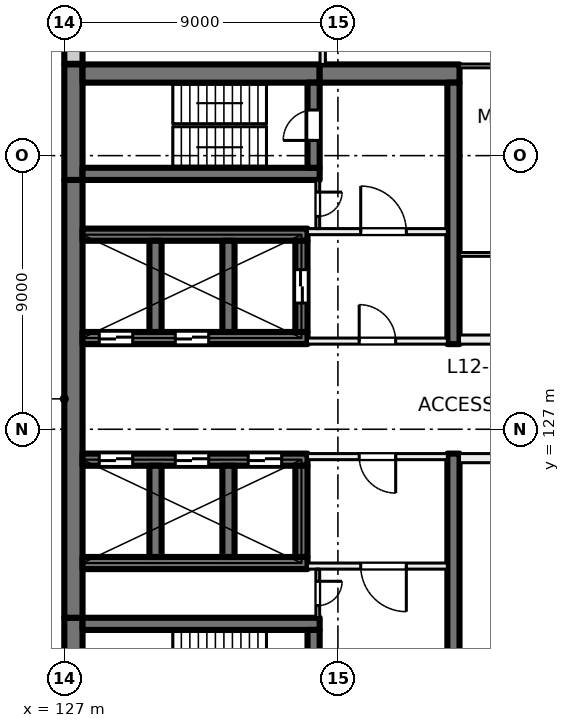
"""IFC4 building model, lengths in metres.
Left out: names, types, materials, properties, quantities, classifications, styles, units other than length and angle.
Written with IfcOpenShell. Run it as: python <this file> out.ifc"""

import sys

from ifc_helpers import new_model, si_unit, direction, frame, frame_2d, origin, place, context, subcontext, project, spatial, rectangle, extrude, element, fill, save


model = new_model("IFC4")
c1 = context("Model", 3, precision=1e-05, world=origin(), true_north=direction((0.0, 1.0)))
c2 = subcontext(c1, "Body", "Model", "MODEL_VIEW")
j1 = project(units=[si_unit("LENGTHUNIT", "METRE"), si_unit("PLANEANGLEUNIT", "RADIAN")], contexts=[c1])
p1 = place(None, origin())
s1 = spatial("IfcSite", under=j1, at=p1, CompositionType="ELEMENT")
p2 = place(p1, origin())
s2 = spatial("IfcBuilding", under=s1, at=p2, CompositionType="ELEMENT")
p3 = place(p2, frame((0.0, 0.0, 55.5)))
s3 = spatial("IfcBuildingStorey", under=s2, at=p3, CompositionType="ELEMENT", Elevation=55.5)
p4 = place(p3, frame((127.3, 117.0, 0.0), z_axis=(0.0, 0.0, 1.0), x_axis=(0.0, 1.0, 0.0)))
e1 = element("IfcWall", 1, at=p4, inside=s3, PredefinedType="SHEAR", context=c2, shape_type="SweptSolid", body=[
    extrude(rectangle(XDim=3.8, YDim=0.6, at=frame_2d((1.9, 0.0))), origin(), (0.0, 0.0, 1.0), 4.0),
])
p5 = place(p3, frame((127.3, 120.8, 0.0), z_axis=(0.0, 0.0, 1.0), x_axis=(0.0, 1.0, 0.0)))
e2 = element("IfcWall", 2, at=p5, inside=s3, PredefinedType="SHEAR", context=c2, shape_type="SweptSolid", body=[
    extrude(rectangle(XDim=14.4, YDim=0.6, at=frame_2d((7.2, 0.0))), origin(), (0.0, 0.0, 1.0), 4.0),
])
p6 = place(p3, frame((127.3, 135.2, 0.0), z_axis=(0.0, 0.0, 1.0), x_axis=(0.0, 1.0, 0.0)))
e3 = element("IfcWall", 3, at=p6, inside=s3, PredefinedType="SHEAR", context=c2, shape_type="SweptSolid", body=[
    extrude(rectangle(XDim=3.8, YDim=0.6, at=frame_2d((1.9, 0.0))), origin(), (0.0, 0.0, 1.0), 4.0),
])
p7 = place(p3, frame((127.6, 138.7, 0.0), z_axis=(0.0, 0.0, 1.0), x_axis=(1.0, 0.0, 0.0)))
e4 = element("IfcWall", 4, at=p7, inside=s3, PredefinedType="SHEAR", context=c2, shape_type="SweptSolid", body=[
    extrude(rectangle(XDim=7.8, YDim=0.6, at=frame_2d((3.9, 0.0))), origin(), (0.0, 0.0, 1.0), 4.0),
])
p8 = place(p3, frame((135.4, 138.7, 0.0), z_axis=(0.0, 0.0, 1.0), x_axis=(1.0, 0.0, 0.0)))
e5 = element("IfcWall", 5, at=p8, inside=s3, PredefinedType="SHEAR", context=c2, shape_type="SweptSolid", body=[
    extrude(rectangle(XDim=4.6, YDim=0.6, at=frame_2d((2.3, 0.0))), origin(), (0.0, 0.0, 1.0), 4.0),
])
p9 = place(p3, frame((127.6, 120.6, 0.0), z_axis=(0.0, 0.0, 1.0), x_axis=(1.0, 0.0, 0.0)))
e6 = element("IfcWall", 6, at=p9, inside=s3, PredefinedType="SHEAR", context=c2, shape_type="SweptSolid", body=[
    extrude(rectangle(XDim=7.8, YDim=0.4, at=frame_2d((3.9, 0.0))), origin(), (0.0, 0.0, 1.0), 4.0),
])
p10 = place(p3, frame((135.2, 117.6, 0.0), z_axis=(0.0, 0.0, 1.0), x_axis=(0.0, 1.0, 0.0)))
e7 = element("IfcWall", 7, at=p10, inside=s3, PredefinedType="SHEAR", context=c2, shape_type="SweptSolid", body=[
    extrude(rectangle(XDim=2.8, YDim=0.4, at=frame_2d((1.4, 0.0))), origin(), (0.0, 0.0, 1.0), 4.0),
])
p11 = place(p10, frame((0.9, 0.0, 0.0)))
e8 = element("IfcOpeningElement", 8, at=p11, cuts=e7, PredefinedType="OPENING", context=c2, shape_type="SweptSolid", body=[
    extrude(rectangle(XDim=1.0, YDim=2.1, at=frame_2d((0.5, 1.05))), frame((0.0, 0.21, 0.0), z_axis=(0.0, -1.0, 0.0), x_axis=(1.0, 0.0, 0.0)), (0.0, 0.0, 1.0), 0.42),
])
p12 = place(p3, frame((127.6, 135.4, 0.0), z_axis=(0.0, 0.0, 1.0), x_axis=(1.0, 0.0, 0.0)))
e9 = element("IfcWall", 9, at=p12, inside=s3, PredefinedType="SHEAR", context=c2, shape_type="SweptSolid", body=[
    extrude(rectangle(XDim=7.8, YDim=0.4, at=frame_2d((3.9, 0.0))), origin(), (0.0, 0.0, 1.0), 4.0),
])
p13 = place(p3, frame((135.2, 135.6, 0.0), z_axis=(0.0, 0.0, 1.0), x_axis=(0.0, 1.0, 0.0)))
e10 = element("IfcWall", 10, at=p13, inside=s3, PredefinedType="SHEAR", context=c2, shape_type="SweptSolid", body=[
    extrude(rectangle(XDim=2.8, YDim=0.4, at=frame_2d((1.4, 0.0))), origin(), (0.0, 0.0, 1.0), 4.0),
])
p14 = place(p13, frame((0.9, 0.0, 0.0)))
e11 = element("IfcOpeningElement", 11, at=p14, cuts=e10, PredefinedType="OPENING", context=c2, shape_type="SweptSolid", body=[
    extrude(rectangle(XDim=1.0, YDim=2.1, at=frame_2d((0.5, 1.05))), frame((0.0, 0.21, 0.0), z_axis=(0.0, -1.0, 0.0), x_axis=(1.0, 0.0, 0.0)), (0.0, 0.0, 1.0), 0.42),
])
p15 = place(p3, frame((127.6, 126.0, 0.0), z_axis=(0.0, 0.0, 1.0), x_axis=(1.0, 0.0, 0.0)))
e12 = element("IfcWall", 12, at=p15, inside=s3, PredefinedType="SHEAR", context=c2, shape_type="SweptSolid", body=[
    extrude(rectangle(XDim=7.4, YDim=0.4, at=frame_2d((3.7, 0.0))), origin(), (0.0, 0.0, 1.0), 4.0),
])
p16 = place(p15, frame((0.55, 0.0, 0.0)))
e13 = element("IfcOpeningElement", 13, at=p16, cuts=e12, PredefinedType="OPENING", context=c2, shape_type="SweptSolid", body=[
    extrude(rectangle(XDim=1.1, YDim=2.1, at=frame_2d((0.55, 1.05))), frame((0.0, 0.21, 0.0), z_axis=(0.0, -1.0, 0.0), x_axis=(1.0, 0.0, 0.0)), (0.0, 0.0, 1.0), 0.42),
])
p17 = place(p15, frame((3.05, 0.0, 0.0)))
e14 = element("IfcOpeningElement", 14, at=p17, cuts=e12, PredefinedType="OPENING", context=c2, shape_type="SweptSolid", body=[
    extrude(rectangle(XDim=1.1, YDim=2.1, at=frame_2d((0.55, 1.05))), frame((0.0, 0.21, 0.0), z_axis=(0.0, -1.0, 0.0), x_axis=(1.0, 0.0, 0.0)), (0.0, 0.0, 1.0), 0.42),
])
p18 = place(p15, frame((5.45, 0.0, 0.0)))
e15 = element("IfcOpeningElement", 15, at=p18, cuts=e12, PredefinedType="OPENING", context=c2, shape_type="SweptSolid", body=[
    extrude(rectangle(XDim=1.1, YDim=2.1, at=frame_2d((0.55, 1.05))), frame((0.0, 0.21, 0.0), z_axis=(0.0, -1.0, 0.0), x_axis=(1.0, 0.0, 0.0)), (0.0, 0.0, 1.0), 0.42),
])
p19 = place(p3, frame((127.6, 122.6, 0.0), z_axis=(0.0, 0.0, 1.0), x_axis=(1.0, 0.0, 0.0)))
e16 = element("IfcWall", 16, at=p19, inside=s3, PredefinedType="SHEAR", context=c2, shape_type="SweptSolid", body=[
    extrude(rectangle(XDim=7.4, YDim=0.4, at=frame_2d((3.7, 0.0))), origin(), (0.0, 0.0, 1.0), 4.0),
])
for number, where, z_axis, x_axis in (
    (17, (130.0, 122.8, 0.0), (0.0, 0.0, 1.0), (0.0, 1.0, 0.0)),
    (18, (132.4, 122.8, 0.0), (0.0, 0.0, 1.0), (0.0, 1.0, 0.0)),
    (19, (134.8, 122.8, 0.0), (0.0, 0.0, 1.0), (0.0, 1.0, 0.0)),
):
    element("IfcWall", number, at=place(p3, frame(where, z_axis=z_axis, x_axis=x_axis)), inside=s3, PredefinedType="SHEAR", context=c2, shape_type="SweptSolid", body=[
        extrude(rectangle(XDim=3.0, YDim=0.4, at=frame_2d((1.5, 0.0))), origin(), (0.0, 0.0, 1.0), 4.0),
    ])
p20 = place(p3, frame((127.6, 130.0, 0.0), z_axis=(0.0, 0.0, 1.0), x_axis=(1.0, 0.0, 0.0)))
e20 = element("IfcWall", 20, at=p20, inside=s3, PredefinedType="SHEAR", context=c2, shape_type="SweptSolid", body=[
    extrude(rectangle(XDim=7.4, YDim=0.4, at=frame_2d((3.7, 0.0))), origin(), (0.0, 0.0, 1.0), 4.0),
])
p21 = place(p20, frame((0.55, 0.0, 0.0)))
e21 = element("IfcOpeningElement", 21, at=p21, cuts=e20, PredefinedType="OPENING", context=c2, shape_type="SweptSolid", body=[
    extrude(rectangle(XDim=1.1, YDim=2.1, at=frame_2d((0.55, 1.05))), frame((0.0, 0.21, 0.0), z_axis=(0.0, -1.0, 0.0), x_axis=(1.0, 0.0, 0.0)), (0.0, 0.0, 1.0), 0.42),
])
p22 = place(p20, frame((3.05, 0.0, 0.0)))
e22 = element("IfcOpeningElement", 22, at=p22, cuts=e20, PredefinedType="OPENING", context=c2, shape_type="SweptSolid", body=[
    extrude(rectangle(XDim=1.1, YDim=2.1, at=frame_2d((0.55, 1.05))), frame((0.0, 0.21, 0.0), z_axis=(0.0, -1.0, 0.0), x_axis=(1.0, 0.0, 0.0)), (0.0, 0.0, 1.0), 0.42),
])
p23 = place(p3, frame((127.6, 133.4, 0.0), z_axis=(0.0, 0.0, 1.0), x_axis=(1.0, 0.0, 0.0)))
e23 = element("IfcWall", 23, at=p23, inside=s3, PredefinedType="SHEAR", context=c2, shape_type="SweptSolid", body=[
    extrude(rectangle(XDim=7.4, YDim=0.4, at=frame_2d((3.7, 0.0))), origin(), (0.0, 0.0, 1.0), 4.0),
])
for number, where, z_axis, x_axis in (
    (24, (130.0, 130.2, 0.0), (0.0, 0.0, 1.0), (0.0, 1.0, 0.0)),
    (25, (132.4, 130.2, 0.0), (0.0, 0.0, 1.0), (0.0, 1.0, 0.0)),
):
    element("IfcWall", number, at=place(p3, frame(where, z_axis=z_axis, x_axis=x_axis)), inside=s3, PredefinedType="SHEAR", context=c2, shape_type="SweptSolid", body=[
        extrude(rectangle(XDim=3.0, YDim=0.4, at=frame_2d((1.5, 0.0))), origin(), (0.0, 0.0, 1.0), 4.0),
    ])
p24 = place(p3, frame((134.8, 130.2, 0.0), z_axis=(0.0, 0.0, 1.0), x_axis=(0.0, 1.0, 0.0)))
e26 = element("IfcWall", 26, at=p24, inside=s3, PredefinedType="SHEAR", context=c2, shape_type="SweptSolid", body=[
    extrude(rectangle(XDim=3.0, YDim=0.4, at=frame_2d((1.5, 0.0))), origin(), (0.0, 0.0, 1.0), 4.0),
])
p25 = place(p24, frame((0.95, 0.0, 0.0)))
e27 = element("IfcOpeningElement", 27, at=p25, cuts=e26, PredefinedType="OPENING", context=c2, shape_type="SweptSolid", body=[
    extrude(rectangle(XDim=1.1, YDim=2.1, at=frame_2d((0.55, 1.05))), frame((0.0, 0.21, 0.0), z_axis=(0.0, -1.0, 0.0), x_axis=(1.0, 0.0, 0.0)), (0.0, 0.0, 1.0), 0.42),
])
for number, where, z_axis, x_axis in (
    (28, (139.8, 117.6, 0.0), (0.0, 0.0, 1.0), (0.0, 1.0, 0.0)),
    (29, (139.8, 129.8, 0.0), (0.0, 0.0, 1.0), (0.0, 1.0, 0.0)),
):
    element("IfcWall", number, at=place(p3, frame(where, z_axis=z_axis, x_axis=x_axis)), inside=s3, PredefinedType="SHEAR", context=c2, shape_type="SweptSolid", body=[
        extrude(rectangle(XDim=8.6, YDim=0.4, at=frame_2d((4.3, 0.0))), origin(), (0.0, 0.0, 1.0), 4.0),
    ])
p26 = place(p3, frame((127.3, 139.02, 0.0), z_axis=(0.0, 0.0, 1.0), x_axis=(0.0, 1.0, 0.0)))
e30 = element("IfcWall", 30, at=p26, inside=s3, PredefinedType="SOLIDWALL", context=c2, shape_type="SweptSolid", body=[
    extrude(rectangle(XDim=2.98, YDim=0.6, at=frame_2d((1.49, 0.0))), origin(), (0.0, 0.0, 1.0), 3.625),
])
p27 = place(p3, frame((135.0, 129.9, 0.0), z_axis=(0.0, 0.0, 1.0), x_axis=(1.0, 0.0, 0.0)))
e31 = element("IfcWall", 31, at=p27, inside=s3, PredefinedType="PARTITIONING", context=c2, shape_type="SweptSolid", body=[
    extrude(rectangle(XDim=4.6, YDim=0.2, at=frame_2d((2.3, 0.0))), origin(), (0.0, 0.0, 1.0), 3.625),
])
p28 = place(p27, frame((1.7, 0.0, 0.0)))
e32 = element("IfcOpeningElement", 32, at=p28, cuts=e31, PredefinedType="OPENING", context=c2, shape_type="SweptSolid", body=[
    extrude(rectangle(XDim=1.2, YDim=2.1, at=frame_2d((0.6, 1.05))), frame((0.0, 0.11, 0.0), z_axis=(0.0, -1.0, 0.0), x_axis=(1.0, 0.0, 0.0)), (0.0, 0.0, 1.0), 0.22),
])
p29 = place(p3, frame((135.0, 133.5, 0.0), z_axis=(0.0, 0.0, 1.0), x_axis=(1.0, 0.0, 0.0)))
e33 = element("IfcWall", 33, at=p29, inside=s3, PredefinedType="PARTITIONING", context=c2, shape_type="SweptSolid", body=[
    extrude(rectangle(XDim=4.6, YDim=0.2, at=frame_2d((2.3, 0.0))), origin(), (0.0, 0.0, 1.0), 3.625),
])
p30 = place(p29, frame((1.75, 0.0, 0.0)))
e34 = element("IfcOpeningElement", 34, at=p30, cuts=e33, PredefinedType="OPENING", context=c2, shape_type="SweptSolid", body=[
    extrude(rectangle(XDim=1.5, YDim=2.1, at=frame_2d((0.75, 1.05))), frame((0.0, 0.11, 0.0), z_axis=(0.0, -1.0, 0.0), x_axis=(1.0, 0.0, 0.0)), (0.0, 0.0, 1.0), 0.22),
])
p31 = place(p3, frame((135.337, 135.2, 0.0), z_axis=(0.0, 0.0, 1.0), x_axis=(0.0, -1.0, 0.0)))
e35 = element("IfcWall", 35, at=p31, inside=s3, PredefinedType="PARTITIONING", context=c2, shape_type="SweptSolid", body=[
    extrude(rectangle(XDim=1.6, YDim=0.125, at=frame_2d((0.8, 0.0))), origin(), (0.0, 0.0, 1.0), 3.625),
])
p32 = place(p31, frame((0.4, 0.0, 0.0)))
e36 = element("IfcOpeningElement", 36, at=p32, cuts=e35, PredefinedType="OPENING", context=c2, shape_type="SweptSolid", body=[
    extrude(rectangle(XDim=0.8, YDim=2.1, at=frame_2d((0.4, 1.05))), frame((0.0, 0.073, 0.0), z_axis=(0.0, -1.0, 0.0), x_axis=(1.0, 0.0, 0.0)), (0.0, 0.0, 1.0), 0.145),
])
p33 = place(p3, frame((139.6, 126.1, 0.0), z_axis=(0.0, 0.0, 1.0), x_axis=(-1.0, 0.0, 0.0)))
e37 = element("IfcWall", 37, at=p33, inside=s3, PredefinedType="PARTITIONING", context=c2, shape_type="SweptSolid", body=[
    extrude(rectangle(XDim=4.6, YDim=0.2, at=frame_2d((2.3, 0.0))), origin(), (0.0, 0.0, 1.0), 3.625),
])
p34 = place(p33, frame((1.7, 0.0, 0.0)))
e38 = element("IfcOpeningElement", 38, at=p34, cuts=e37, PredefinedType="OPENING", context=c2, shape_type="SweptSolid", body=[
    extrude(rectangle(XDim=1.2, YDim=2.1, at=frame_2d((0.6, 1.05))), frame((0.0, 0.11, 0.0), z_axis=(0.0, -1.0, 0.0), x_axis=(1.0, 0.0, 0.0)), (0.0, 0.0, 1.0), 0.22),
])
p35 = place(p3, frame((139.6, 122.5, 0.0), z_axis=(0.0, 0.0, 1.0), x_axis=(-1.0, 0.0, 0.0)))
e39 = element("IfcWall", 39, at=p35, inside=s3, PredefinedType="PARTITIONING", context=c2, shape_type="SweptSolid", body=[
    extrude(rectangle(XDim=4.6, YDim=0.2, at=frame_2d((2.3, 0.0))), origin(), (0.0, 0.0, 1.0), 3.625),
])
p36 = place(p35, frame((1.35, 0.0, 0.0)))
e40 = element("IfcOpeningElement", 40, at=p36, cuts=e39, PredefinedType="OPENING", context=c2, shape_type="SweptSolid", body=[
    extrude(rectangle(XDim=1.5, YDim=2.1, at=frame_2d((0.75, 1.05))), frame((0.0, 0.11, 0.0), z_axis=(0.0, -1.0, 0.0), x_axis=(1.0, 0.0, 0.0)), (0.0, 0.0, 1.0), 0.22),
])
p37 = place(p3, frame((135.337, 122.4, 0.0), z_axis=(0.0, 0.0, 1.0), x_axis=(0.0, -1.0, 0.0)))
e41 = element("IfcWall", 41, at=p37, inside=s3, PredefinedType="PARTITIONING", context=c2, shape_type="SweptSolid", body=[
    extrude(rectangle(XDim=1.6, YDim=0.125, at=frame_2d((0.8, 0.0))), origin(), (0.0, 0.0, 1.0), 3.625),
])
p38 = place(p37, frame((0.4, 0.0, 0.0)))
e42 = element("IfcOpeningElement", 42, at=p38, cuts=e41, PredefinedType="OPENING", context=c2, shape_type="SweptSolid", body=[
    extrude(rectangle(XDim=0.8, YDim=2.1, at=frame_2d((0.4, 1.05))), frame((0.0, 0.073, 0.0), z_axis=(0.0, -1.0, 0.0), x_axis=(1.0, 0.0, 0.0)), (0.0, 0.0, 1.0), 0.145),
])
p39 = place(p3, frame((135.5, 145.4, 0.0), z_axis=(0.0, 0.0, 1.0), x_axis=(0.0, -1.0, 0.0)))
e43 = element("IfcWall", 43, at=p39, inside=s3, PredefinedType="PARTITIONING", context=c2, shape_type="SweptSolid", body=[
    extrude(rectangle(XDim=6.4, YDim=0.175, at=frame_2d((3.2, 0.0))), origin(), (0.0, 0.0, 1.0), 3.625),
])
p40 = place(p39, frame((2.6, 0.0, 0.0)))
e44 = element("IfcOpeningElement", 44, at=p40, cuts=e43, PredefinedType="OPENING", context=c2, shape_type="SweptSolid", body=[
    extrude(rectangle(XDim=1.2, YDim=2.1, at=frame_2d((0.6, 1.05))), frame((0.0, 0.097, 0.0), z_axis=(0.0, -1.0, 0.0), x_axis=(1.0, 0.0, 0.0)), (0.0, 0.0, 1.0), 0.195),
])
p41 = place(p3, frame((140.0, 129.95, 0.0), z_axis=(0.0, 0.0, 1.0), x_axis=(1.0, 0.0, 0.0)))
e45 = element("IfcWall", 45, at=p41, inside=s3, PredefinedType="PARTITIONING", context=c2, shape_type="SweptSolid", body=[
    extrude(rectangle(XDim=14.0, YDim=0.3, at=frame_2d((7.0, 0.0))), origin(), (0.0, 0.0, 1.0), 3.625),
])
p42 = place(p41, frame((5.25, 0.0, 0.0)))
e46 = element("IfcOpeningElement", 46, at=p42, cuts=e45, PredefinedType="OPENING", context=c2, shape_type="SweptSolid", body=[
    extrude(rectangle(XDim=1.0, YDim=2.1, at=frame_2d((0.5, 1.05))), frame((0.0, 0.16, 0.0), z_axis=(0.0, -1.0, 0.0), x_axis=(1.0, 0.0, 0.0)), (0.0, 0.0, 1.0), 0.32),
])
p43 = place(p41, frame((10.6, 0.0, 0.0)))
e47 = element("IfcOpeningElement", 47, at=p43, cuts=e45, PredefinedType="OPENING", context=c2, shape_type="SweptSolid", body=[
    extrude(rectangle(XDim=1.8, YDim=2.1, at=frame_2d((0.9, 1.05))), frame((0.0, 0.16, 0.0), z_axis=(0.0, -1.0, 0.0), x_axis=(1.0, 0.0, 0.0)), (0.0, 0.0, 1.0), 0.32),
])
p44 = place(p3, frame((140.0, 132.75, 0.0), z_axis=(0.0, 0.0, 1.0), x_axis=(1.0, 0.0, 0.0)))
e48 = element("IfcWall", 48, at=p44, inside=s3, PredefinedType="PARTITIONING", context=c2, shape_type="SweptSolid", body=[
    extrude(rectangle(XDim=8.938, YDim=0.125, at=frame_2d((4.469, 0.0))), origin(), (0.0, 0.0, 1.0), 3.625),
])
p45 = place(p44, frame((6.329, 0.0, 0.0)))
e49 = element("IfcOpeningElement", 49, at=p45, cuts=e48, PredefinedType="OPENING", context=c2, shape_type="SweptSolid", body=[
    extrude(rectangle(XDim=0.8, YDim=2.1, at=frame_2d((0.4, 1.05))), frame((0.0, 0.073, 0.0), z_axis=(0.0, -1.0, 0.0), x_axis=(1.0, 0.0, 0.0)), (0.0, 0.0, 1.0), 0.145),
])
p46 = place(p44, frame((3.1, 0.0, 0.0)))
e50 = element("IfcOpeningElement", 50, at=p46, cuts=e48, PredefinedType="OPENING", context=c2, shape_type="SweptSolid", body=[
    extrude(rectangle(XDim=0.8, YDim=2.1, at=frame_2d((0.4, 1.05))), frame((0.0, 0.073, 0.0), z_axis=(0.0, -1.0, 0.0), x_axis=(1.0, 0.0, 0.0)), (0.0, 0.0, 1.0), 0.145),
])
p47 = place(p3, frame((140.0, 138.95, 0.0), z_axis=(0.0, 0.0, 1.0), x_axis=(1.0, 0.0, 0.0)))
e51 = element("IfcWall", 51, at=p47, inside=s3, PredefinedType="PARTITIONING", context=c2, shape_type="SweptSolid", body=[
    extrude(rectangle(XDim=8.938, YDim=0.125, at=frame_2d((4.469, 0.0))), origin(), (0.0, 0.0, 1.0), 3.625),
])
p48 = place(p3, frame((154.0, 126.05, 0.0), z_axis=(0.0, 0.0, 1.0), x_axis=(-1.0, 0.0, 0.0)))
e52 = element("IfcWall", 52, at=p48, inside=s3, PredefinedType="PARTITIONING", context=c2, shape_type="SweptSolid", body=[
    extrude(rectangle(XDim=14.0, YDim=0.3, at=frame_2d((7.0, 0.0))), origin(), (0.0, 0.0, 1.0), 3.625),
])
p49 = place(p48, frame((6.1, 0.0, 0.0)))
e53 = element("IfcOpeningElement", 53, at=p49, cuts=e52, PredefinedType="OPENING", context=c2, shape_type="SweptSolid", body=[
    extrude(rectangle(XDim=1.8, YDim=2.1, at=frame_2d((0.9, 1.05))), frame((0.0, 0.16, 0.0), z_axis=(0.0, -1.0, 0.0), x_axis=(1.0, 0.0, 0.0)), (0.0, 0.0, 1.0), 0.32),
])
p50 = place(p21, origin())
e54 = element("IfcDoor", 54, at=p50, inside=s3, OperationType="DOUBLE_DOOR_SLIDING", PredefinedType="DOOR", context=c2, shape_type="SweptSolid", body=[
    extrude(rectangle(XDim=1.1, YDim=2.1, at=frame_2d((0.55, 1.05))), frame((0.0, 0.025, 0.0), z_axis=(0.0, -1.0, 0.0), x_axis=(1.0, 0.0, 0.0)), (0.0, 0.0, 1.0), 0.05),
])
fill(e21, e54)
p51 = place(p22, origin())
e55 = element("IfcDoor", 55, at=p51, inside=s3, OperationType="DOUBLE_DOOR_SLIDING", PredefinedType="DOOR", context=c2, shape_type="SweptSolid", body=[
    extrude(rectangle(XDim=1.1, YDim=2.1, at=frame_2d((0.55, 1.05))), frame((0.0, 0.025, 0.0), z_axis=(0.0, -1.0, 0.0), x_axis=(1.0, 0.0, 0.0)), (0.0, 0.0, 1.0), 0.05),
])
fill(e22, e55)
p52 = place(p16, origin())
e56 = element("IfcDoor", 56, at=p52, inside=s3, OperationType="DOUBLE_DOOR_SLIDING", PredefinedType="DOOR", context=c2, shape_type="SweptSolid", body=[
    extrude(rectangle(XDim=1.1, YDim=2.1, at=frame_2d((0.55, 1.05))), frame((0.0, 0.025, 0.0), z_axis=(0.0, -1.0, 0.0), x_axis=(1.0, 0.0, 0.0)), (0.0, 0.0, 1.0), 0.05),
])
fill(e13, e56)
p53 = place(p17, origin())
e57 = element("IfcDoor", 57, at=p53, inside=s3, OperationType="DOUBLE_DOOR_SLIDING", PredefinedType="DOOR", context=c2, shape_type="SweptSolid", body=[
    extrude(rectangle(XDim=1.1, YDim=2.1, at=frame_2d((0.55, 1.05))), frame((0.0, 0.025, 0.0), z_axis=(0.0, -1.0, 0.0), x_axis=(1.0, 0.0, 0.0)), (0.0, 0.0, 1.0), 0.05),
])
fill(e14, e57)
p54 = place(p18, origin())
e58 = element("IfcDoor", 58, at=p54, inside=s3, OperationType="DOUBLE_DOOR_SLIDING", PredefinedType="DOOR", context=c2, shape_type="SweptSolid", body=[
    extrude(rectangle(XDim=1.1, YDim=2.1, at=frame_2d((0.55, 1.05))), frame((0.0, 0.025, 0.0), z_axis=(0.0, -1.0, 0.0), x_axis=(1.0, 0.0, 0.0)), (0.0, 0.0, 1.0), 0.05),
])
fill(e15, e58)
p55 = place(p28, origin())
e59 = element("IfcDoor", 59, at=p55, inside=s3, OperationType="DOUBLE_DOOR_SINGLE_SWING", PredefinedType="DOOR", context=c2, shape_type="SweptSolid", body=[
    extrude(rectangle(XDim=1.2, YDim=2.1, at=frame_2d((0.6, 1.05))), frame((0.0, 0.025, 0.0), z_axis=(0.0, -1.0, 0.0), x_axis=(1.0, 0.0, 0.0)), (0.0, 0.0, 1.0), 0.05),
])
fill(e32, e59)
p56 = place(p30, origin())
e60 = element("IfcDoor", 60, at=p56, inside=s3, OperationType="DOUBLE_DOOR_SINGLE_SWING", PredefinedType="DOOR", context=c2, shape_type="SweptSolid", body=[
    extrude(rectangle(XDim=1.5, YDim=2.1, at=frame_2d((0.75, 1.05))), frame((0.0, 0.025, 0.0), z_axis=(0.0, -1.0, 0.0), x_axis=(1.0, 0.0, 0.0)), (0.0, 0.0, 1.0), 0.05),
])
fill(e34, e60)
p57 = place(p14, origin())
e61 = element("IfcDoor", 61, at=p57, inside=s3, OperationType="SINGLE_SWING_LEFT", PredefinedType="DOOR", context=c2, shape_type="SweptSolid", body=[
    extrude(rectangle(XDim=1.0, YDim=2.1, at=frame_2d((0.5, 1.05))), frame((0.0, 0.025, 0.0), z_axis=(0.0, -1.0, 0.0), x_axis=(1.0, 0.0, 0.0)), (0.0, 0.0, 1.0), 0.05),
])
fill(e11, e61)
p58 = place(p32, origin())
e62 = element("IfcDoor", 62, at=p58, inside=s3, OperationType="SINGLE_SWING_RIGHT", PredefinedType="DOOR", context=c2, shape_type="SweptSolid", body=[
    extrude(rectangle(XDim=0.8, YDim=2.1, at=frame_2d((0.4, 1.05))), frame((0.0, 0.025, 0.0), z_axis=(0.0, -1.0, 0.0), x_axis=(1.0, 0.0, 0.0)), (0.0, 0.0, 1.0), 0.05),
])
fill(e36, e62)
p59 = place(p34, origin())
e63 = element("IfcDoor", 63, at=p59, inside=s3, OperationType="DOUBLE_DOOR_SINGLE_SWING", PredefinedType="DOOR", context=c2, shape_type="SweptSolid", body=[
    extrude(rectangle(XDim=1.2, YDim=2.1, at=frame_2d((0.6, 1.05))), frame((0.0, 0.025, 0.0), z_axis=(0.0, -1.0, 0.0), x_axis=(1.0, 0.0, 0.0)), (0.0, 0.0, 1.0), 0.05),
])
fill(e38, e63)
p60 = place(p36, origin())
e64 = element("IfcDoor", 64, at=p60, inside=s3, OperationType="DOUBLE_DOOR_SINGLE_SWING", PredefinedType="DOOR", context=c2, shape_type="SweptSolid", body=[
    extrude(rectangle(XDim=1.5, YDim=2.1, at=frame_2d((0.75, 1.05))), frame((0.0, 0.025, 0.0), z_axis=(0.0, -1.0, 0.0), x_axis=(1.0, 0.0, 0.0)), (0.0, 0.0, 1.0), 0.05),
])
fill(e40, e64)
p61 = place(p38, origin())
e65 = element("IfcDoor", 65, at=p61, inside=s3, OperationType="SINGLE_SWING_LEFT", PredefinedType="DOOR", context=c2, shape_type="SweptSolid", body=[
    extrude(rectangle(XDim=0.8, YDim=2.1, at=frame_2d((0.4, 1.05))), frame((0.0, 0.025, 0.0), z_axis=(0.0, -1.0, 0.0), x_axis=(1.0, 0.0, 0.0)), (0.0, 0.0, 1.0), 0.05),
])
fill(e42, e65)
p62 = place(p25, origin())
e66 = element("IfcDoor", 66, at=p62, inside=s3, OperationType="DOUBLE_DOOR_SLIDING", PredefinedType="DOOR", context=c2, shape_type="SweptSolid", body=[
    extrude(rectangle(XDim=1.1, YDim=2.1, at=frame_2d((0.55, 1.05))), frame((0.0, 0.025, 0.0), z_axis=(0.0, -1.0, 0.0), x_axis=(1.0, 0.0, 0.0)), (0.0, 0.0, 1.0), 0.05),
])
fill(e27, e66)
save(model, sys.argv[1])
